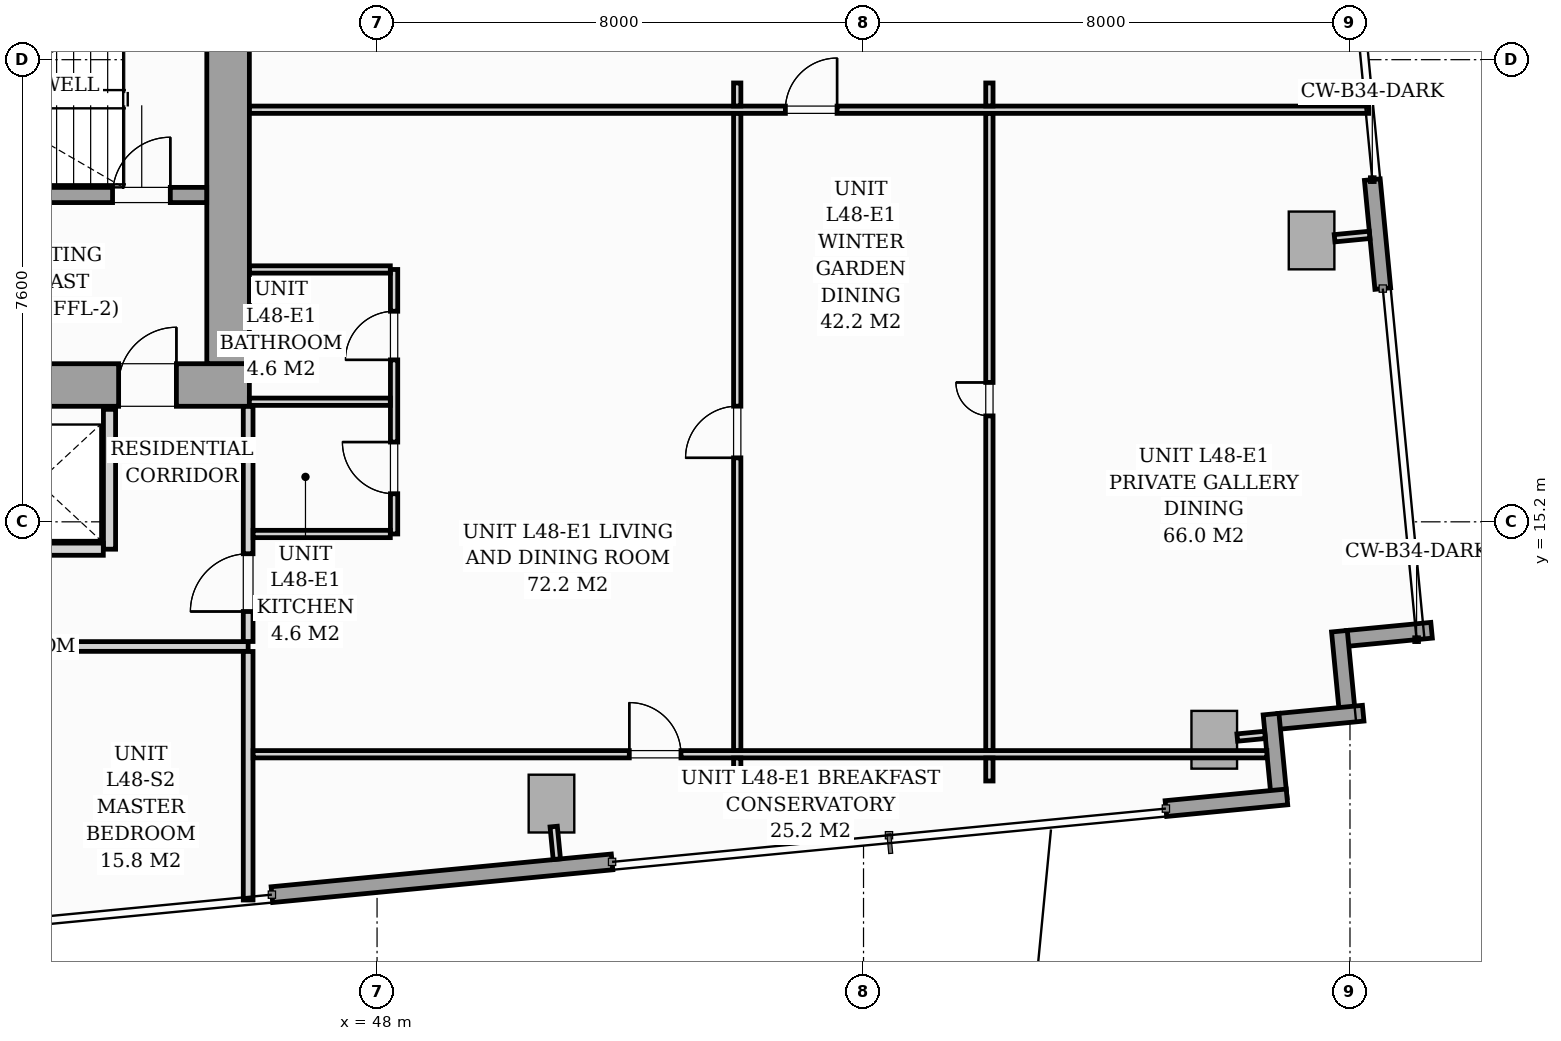
"""IFC4 building model, lengths in metres.
Left out: names, types, materials, properties, quantities, classifications, styles, units other than length and angle.
Written with IfcOpenShell. Run it as: python <this file> out.ifc"""

import sys

from ifc_helpers import new_model, si_unit, direction, frame, frame_2d, origin, origin_2d, place, context, subcontext, project, spatial, rectangle, i_section, extrude, source, transform, mapped, element, fill, save


model = new_model("IFC4")
c1 = context("Model", 3, precision=1e-05, world=origin(), true_north=direction((0.0, 1.0)))
c2 = subcontext(c1, "Body", "Model", "MODEL_VIEW")
j1 = project(units=[si_unit("LENGTHUNIT", "METRE"), si_unit("PLANEANGLEUNIT", "RADIAN")], contexts=[c1])
p1 = place(None, origin())
s1 = spatial("IfcSite", under=j1, at=p1, CompositionType="ELEMENT")
p2 = place(p1, origin())
s2 = spatial("IfcBuilding", under=s1, at=p2, CompositionType="ELEMENT")
p3 = place(p2, frame((0.0, 0.0, 167.8)))
s3 = spatial("IfcBuildingStorey", under=s2, at=p3, CompositionType="ELEMENT", Elevation=167.8)
m1 = source(origin(), c2, "Body", "SweptSolid", [
    extrude(i_section(OverallWidth=0.416, OverallDepth=0.446, WebThickness=0.039, FlangeThickness=0.063, FilletRadius=0.018, at=origin_2d()), origin(), (0.0, 0.0, 1.0), 5.196),
])
p4 = place(p3, frame((45.6, 17.4, 0.002), z_axis=(0.0, 0.0, 1.0), x_axis=(1.0, 0.0, 0.0)))
e1 = element("IfcColumn", 1, at=p4, inside=s3, PredefinedType="PILASTER", context=c2, shape_type="MappedRepresentation", body=[
    mapped(m1, transform((0.0, 0.0, 0.0), scale=1.0)),
])
m2 = source(origin(), c2, "Body", "SweptSolid", [
    extrude(rectangle(XDim=0.75, YDim=0.95, at=origin_2d()), origin(), (0.0, 0.0, 1.0), 5.194),
])
for number, where, z_axis, x_axis in (
    (2, (50.868, 10.566, 0.004), (0.0, 0.0, 1.0), (0.995, 0.096, 0.0)),
    (3, (61.768, 11.616, 0.004), (0.0, 0.0, 1.0), (0.995, 0.096, 0.0)),
    (4, (63.368, 19.827, 0.004), (0.0, 0.0, 1.0), (0.995, 0.096, 0.0)),
):
    element("IfcColumn", number, at=place(p3, frame(where, z_axis=z_axis, x_axis=x_axis)), inside=s3, PredefinedType="COLUMN", context=c2, shape_type="MappedRepresentation", body=[
        mapped(m2, transform((0.0, 0.0, 0.0), scale=1.0)),
    ])
p5 = place(p3, frame((64.367, 20.827, 0.0), z_axis=(0.0, 0.0, 1.0), x_axis=(0.09589072759, -0.995391866735, 0.0)))
e5 = element("IfcWall", 5, at=p5, inside=s3, PredefinedType="STANDARD", context=c2, shape_type="SweptSolid", body=[
    extrude(rectangle(XDim=1.8, YDim=0.26, at=frame_2d((0.9, 0.0))), origin(), (0.0, 0.0, 1.0), 4.94),
])
p6 = place(p3, frame((65.342, 13.417, 0.0), z_axis=(0.0, 0.0, 1.0), x_axis=(-0.99540774648, -0.095725744959, 0.0)))
e6 = element("IfcWall", 6, at=p6, inside=s3, PredefinedType="STANDARD", context=c2, shape_type="SweptSolid", body=[
    extrude(rectangle(XDim=1.395, YDim=0.26, at=frame_2d((0.698, 0.0))), origin(), (0.0, 0.0, 1.0), 4.94),
])
p7 = place(p3, frame((63.826, 13.401, 0.0), z_axis=(0.0, 0.0, 1.0), x_axis=(0.095915846097, -0.995389446633, 0.0)))
e7 = element("IfcWall", 7, at=p7, inside=s3, PredefinedType="STANDARD", context=c2, shape_type="SweptSolid", body=[
    extrude(rectangle(XDim=1.395, YDim=0.26, at=frame_2d((0.697, 0.0))), origin(), (0.0, 0.0, 1.0), 4.94),
])
for number, where, z_axis, x_axis in (
    (8, (64.217, 12.053, 0.0), (0.0, 0.0, 1.0), (-0.995, -0.096, 0.0)),
    (9, (62.702, 12.037, 0.0), (0.0, 0.0, 1.0), (0.096, -0.995, 0.0)),
):
    element("IfcWall", number, at=place(p3, frame(where, z_axis=z_axis, x_axis=x_axis)), inside=s3, PredefinedType="STANDARD", context=c2, shape_type="SweptSolid", body=[
        extrude(rectangle(XDim=1.395, YDim=0.26, at=frame_2d((0.698, 0.0))), origin(), (0.0, 0.0, 1.0), 4.94),
    ])
p8 = place(p3, frame((62.963, 10.676, 0.0), z_axis=(0.0, 0.0, 1.0), x_axis=(-0.995397839199, -0.095828710298, 0.0)))
e10 = element("IfcWall", 10, at=p8, inside=s3, PredefinedType="STANDARD", context=c2, shape_type="SweptSolid", body=[
    extrude(rectangle(XDim=2.0, YDim=0.26, at=frame_2d((1.0, 0.0))), origin(), (0.0, 0.0, 1.0), 4.94),
])
p9 = place(p3, frame((51.865, 9.607, 0.0), z_axis=(0.0, 0.0, 1.0), x_axis=(-0.995397720284, -0.09582994549, 0.0)))
e11 = element("IfcWall", 11, at=p9, inside=s3, PredefinedType="STANDARD", context=c2, shape_type="SweptSolid", body=[
    extrude(rectangle(XDim=5.62, YDim=0.26, at=frame_2d((2.81, 0.0))), origin(), (0.0, 0.0, 1.0), 4.94),
])
p10 = place(p3, frame((26.1, 17.45, 0.0), z_axis=(0.0, 0.0, 1.0), x_axis=(1.0, 0.0, 0.0)))
e12 = element("IfcWall", 12, at=p10, inside=s3, PredefinedType="SHEAR", context=c2, shape_type="SweptSolid", body=[
    extrude(rectangle(XDim=19.8, YDim=0.7, at=frame_2d((9.9, 0.0))), origin(), (0.0, 0.0, 1.0), 5.2),
])
p11 = place(p10, frame((1.05, 0.0, 0.0)))
e13 = element("IfcOpeningElement", 13, at=p11, cuts=e12, PredefinedType="OPENING", context=c2, shape_type="SweptSolid", body=[
    extrude(rectangle(XDim=0.95, YDim=2.06, at=frame_2d((0.475, 1.03))), frame((0.0, 0.36, 0.0), z_axis=(0.0, -1.0, 0.0), x_axis=(1.0, 0.0, 0.0)), (0.0, 0.0, 1.0), 0.72),
])
p12 = place(p10, frame((9.48, 0.0, 0.0)))
e14 = element("IfcOpeningElement", 14, at=p12, cuts=e12, PredefinedType="OPENING", context=c2, shape_type="SweptSolid", body=[
    extrude(rectangle(XDim=0.9, YDim=2.06, at=frame_2d((0.45, 1.03))), frame((0.0, 0.36, 0.0), z_axis=(0.0, -1.0, 0.0), x_axis=(1.0, 0.0, 0.0)), (0.0, 0.0, 1.0), 0.72),
])
p13 = place(p10, frame((17.65, 0.0, 0.0)))
e15 = element("IfcOpeningElement", 15, at=p13, cuts=e12, PredefinedType="OPENING", context=c2, shape_type="SweptSolid", body=[
    extrude(rectangle(XDim=0.95, YDim=2.06, at=frame_2d((0.475, 1.03))), frame((0.0, 0.36, 0.0), z_axis=(0.0, -1.0, 0.0), x_axis=(1.0, 0.0, 0.0)), (0.0, 0.0, 1.0), 0.72),
])
p14 = place(p3, frame((45.55, 17.802, 0.0), z_axis=(0.0, 0.0, 1.0), x_axis=(0.0, 1.0, 0.0)))
e16 = element("IfcWall", 16, at=p14, inside=s3, PredefinedType="SHEAR", context=c2, shape_type="SweptSolid", body=[
    extrude(rectangle(XDim=5.796, YDim=0.7, at=frame_2d((2.898, 0.0))), origin(), (0.0, 0.0, 1.0), 5.2),
])
p15 = place(p3, frame((37.05, 20.575, 0.0), z_axis=(0.0, 0.0, 1.0), x_axis=(1.0, 0.0, 0.0)))
e17 = element("IfcWall", 17, at=p15, inside=s3, PredefinedType="SOLIDWALL", context=c2, shape_type="SweptSolid", body=[
    extrude(rectangle(XDim=8.148, YDim=0.25, at=frame_2d((4.074, 0.0))), origin(), (0.0, 0.0, 1.0), 5.2),
])
p16 = place(p15, frame((6.6, 0.0, 0.0)))
e18 = element("IfcOpeningElement", 18, at=p16, cuts=e17, PredefinedType="OPENING", context=c2, shape_type="SweptSolid", body=[
    extrude(rectangle(XDim=0.95, YDim=2.06, at=frame_2d((0.475, 1.03))), frame((0.0, 0.135, 0.0), z_axis=(0.0, -1.0, 0.0), x_axis=(1.0, 0.0, 0.0)), (0.0, 0.0, 1.0), 0.27),
])
p17 = place(p3, frame((43.6, 14.75, 0.0), z_axis=(0.0, 0.0, 1.0), x_axis=(0.0, 1.0, 0.0)))
e19 = element("IfcWall", 19, at=p17, inside=s3, PredefinedType="PARTITIONING", context=c2, shape_type="SweptSolid", body=[
    extrude(rectangle(XDim=2.3, YDim=0.2, at=frame_2d((1.15, 0.0))), origin(), (0.0, 0.0, 1.0), 4.94),
])
p18 = place(p3, frame((41.352, 14.75, 0.0), z_axis=(0.0, 0.0, 1.0), x_axis=(1.0, 0.0, 0.0)))
e20 = element("IfcWall", 20, at=p18, inside=s3, PredefinedType="PARTITIONING", context=c2, shape_type="SweptSolid", body=[
    extrude(rectangle(XDim=2.146, YDim=0.2, at=frame_2d((1.073, 0.0))), origin(), (0.0, 0.0, 1.0), 4.94),
])
p19 = place(p3, frame((22.6, 13.15, 0.0), z_axis=(0.0, 0.0, 1.0), x_axis=(1.0, 0.0, 0.0)))
e21 = element("IfcWall", 21, at=p19, inside=s3, PredefinedType="PARTITIONING", context=c2, shape_type="SweptSolid", body=[
    extrude(rectangle(XDim=23.28, YDim=0.16, at=frame_2d((11.64, 0.0))), origin(), (0.0, 0.0, 1.0), 4.94),
])
p20 = place(p19, frame((0.607, 0.0, 0.0)))
e22 = element("IfcOpeningElement", 22, at=p20, cuts=e21, PredefinedType="OPENING", context=c2, shape_type="SweptSolid", body=[
    extrude(rectangle(XDim=0.95, YDim=2.06, at=frame_2d((0.475, 1.03))), frame((0.0, 0.09, 0.0), z_axis=(0.0, -1.0, 0.0), x_axis=(1.0, 0.0, 0.0)), (0.0, 0.0, 1.0), 0.18),
])
p21 = place(p19, frame((11.717, 0.0, 0.0)))
e23 = element("IfcOpeningElement", 23, at=p21, cuts=e21, PredefinedType="OPENING", context=c2, shape_type="SweptSolid", body=[
    extrude(rectangle(XDim=0.95, YDim=2.06, at=frame_2d((0.475, 1.03))), frame((0.0, 0.09, 0.0), z_axis=(0.0, -1.0, 0.0), x_axis=(1.0, 0.0, 0.0)), (0.0, 0.0, 1.0), 0.18),
])
p22 = place(p3, frame((45.88, 8.981, 0.0), z_axis=(0.0, 0.0, 1.0), x_axis=(0.0, 1.0, 0.0)))
e24 = element("IfcWall", 24, at=p22, inside=s3, PredefinedType="PARTITIONING", context=c2, shape_type="SweptSolid", body=[
    extrude(rectangle(XDim=4.087, YDim=0.16, at=frame_2d((2.043, 0.0))), origin(), (0.0, 0.0, 1.0), 4.94),
])
p23 = place(p3, frame((45.88, 13.232, 0.0), z_axis=(0.0, 0.0, 1.0), x_axis=(0.0, 1.0, 0.0)))
e25 = element("IfcWall", 25, at=p23, inside=s3, PredefinedType="PARTITIONING", context=c2, shape_type="SweptSolid", body=[
    extrude(rectangle(XDim=3.866, YDim=0.16, at=frame_2d((1.933, 0.0))), origin(), (0.0, 0.0, 1.0), 4.94),
])
p24 = place(p23, frame((0.493, 0.0, 0.0)))
e26 = element("IfcOpeningElement", 26, at=p24, cuts=e25, PredefinedType="OPENING", context=c2, shape_type="SweptSolid", body=[
    extrude(rectangle(XDim=0.95, YDim=2.06, at=frame_2d((0.475, 1.03))), frame((0.0, 0.09, 0.0), z_axis=(0.0, -1.0, 0.0), x_axis=(1.0, 0.0, 0.0)), (0.0, 0.0, 1.0), 0.18),
])
p25 = place(p3, frame((48.28, 15.0, 0.0), z_axis=(0.0, 0.0, 1.0), x_axis=(0.0, 1.0, 0.0)))
e27 = element("IfcWall", 27, at=p25, inside=s3, PredefinedType="PARTITIONING", context=c2, shape_type="SweptSolid", body=[
    extrude(rectangle(XDim=4.35, YDim=0.12, at=frame_2d((2.175, 0.0))), origin(), (0.0, 0.0, 1.0), 4.94),
])
p26 = place(p25, frame((0.662, 0.0, 0.0)))
e28 = element("IfcOpeningElement", 28, at=p26, cuts=e27, PredefinedType="OPENING", context=c2, shape_type="SweptSolid", body=[
    extrude(rectangle(XDim=0.85, YDim=2.05, at=frame_2d((0.425, 1.025))), frame((0.0, 0.07, 0.0), z_axis=(0.0, -1.0, 0.0), x_axis=(1.0, 0.0, 0.0)), (0.0, 0.0, 1.0), 0.14),
])
p27 = place(p25, frame((2.863, 0.0, 0.0)))
e29 = element("IfcOpeningElement", 29, at=p27, cuts=e27, PredefinedType="OPENING", context=c2, shape_type="SweptSolid", body=[
    extrude(rectangle(XDim=0.8, YDim=2.02, at=frame_2d((0.4, 1.01))), frame((0.0, 0.07, 0.0), z_axis=(0.0, -1.0, 0.0), x_axis=(1.0, 0.0, 0.0)), (0.0, 0.0, 1.0), 0.14),
])
p28 = place(p3, frame((45.9, 17.175, 0.0), z_axis=(0.0, 0.0, 1.0), x_axis=(1.0, 0.0, 0.0)))
e30 = element("IfcWall", 30, at=p28, inside=s3, PredefinedType="PARTITIONING", context=c2, shape_type="SweptSolid", body=[
    extrude(rectangle(XDim=2.318, YDim=0.12, at=frame_2d((1.159, 0.0))), origin(), (0.0, 0.0, 1.0), 4.94),
])
p29 = place(p3, frame((45.962, 15.0, 0.0), z_axis=(0.0, 0.0, 1.0), x_axis=(1.0, 0.0, 0.0)))
e31 = element("IfcWall", 31, at=p29, inside=s3, PredefinedType="PARTITIONING", context=c2, shape_type="SweptSolid", body=[
    extrude(rectangle(XDim=2.256, YDim=0.12, at=frame_2d((1.128, 0.0))), origin(), (0.0, 0.0, 1.0), 4.94),
])
p30 = place(p3, frame((45.902, 19.35, 0.0), z_axis=(0.0, 0.0, 1.0), x_axis=(1.0, 0.0, 0.0)))
e32 = element("IfcWall", 32, at=p30, inside=s3, PredefinedType="PARTITIONING", context=c2, shape_type="SweptSolid", body=[
    extrude(rectangle(XDim=2.316, YDim=0.12, at=frame_2d((1.158, 0.0))), origin(), (0.0, 0.0, 1.0), 4.94),
])
p31 = place(p3, frame((45.902, 21.977, 0.0), z_axis=(0.0, 0.0, 1.0), x_axis=(1.0, 0.0, 0.0)))
e33 = element("IfcWall", 33, at=p31, inside=s3, PredefinedType="PARTITIONING", context=c2, shape_type="SweptSolid", body=[
    extrude(rectangle(XDim=18.404, YDim=0.12, at=frame_2d((9.202, 0.0))), origin(), (0.0, 0.0, 1.0), 4.94),
])
p32 = place(p31, frame((8.813, 0.0, 0.0)))
e34 = element("IfcOpeningElement", 34, at=p32, cuts=e33, PredefinedType="OPENING", context=c2, shape_type="SweptSolid", body=[
    extrude(rectangle(XDim=0.85, YDim=2.05, at=frame_2d((0.425, 1.025))), frame((0.0, 0.07, 0.0), z_axis=(0.0, -1.0, 0.0), x_axis=(1.0, 0.0, 0.0)), (0.0, 0.0, 1.0), 0.14),
])
p33 = place(p3, frame((45.962, 11.378, 0.0), z_axis=(0.0, 0.0, 1.0), x_axis=(1.0, 0.0, 0.0)))
e35 = element("IfcWall", 35, at=p33, inside=s3, PredefinedType="PARTITIONING", context=c2, shape_type="SweptSolid", body=[
    extrude(rectangle(XDim=16.671, YDim=0.12, at=frame_2d((8.335, 0.0))), origin(), (0.0, 0.0, 1.0), 4.383),
])
p34 = place(p33, frame((6.186, 0.0, 0.0)))
e36 = element("IfcOpeningElement", 36, at=p34, cuts=e35, PredefinedType="OPENING", context=c2, shape_type="SweptSolid", body=[
    extrude(rectangle(XDim=0.85, YDim=2.05, at=frame_2d((0.425, 1.025))), frame((0.0, 0.07, 0.0), z_axis=(0.0, -1.0, 0.0), x_axis=(1.0, 0.0, 0.0)), (0.0, 0.0, 1.0), 0.14),
])
p35 = place(p3, frame((58.07, 10.938, 0.0), z_axis=(0.0, 0.0, 1.0), x_axis=(0.0, 1.0, 0.0)))
e37 = element("IfcWall", 37, at=p35, inside=s3, PredefinedType="PARTITIONING", context=c2, shape_type="SweptSolid", body=[
    extrude(rectangle(XDim=0.378, YDim=0.12, at=frame_2d((0.189, 0.0))), origin(), (0.0, 0.0, 1.0), 4.94),
])
p36 = place(p3, frame((58.07, 11.44, 0.0), z_axis=(0.0, 0.0, 1.0), x_axis=(0.0, 1.0, 0.0)))
e38 = element("IfcWall", 38, at=p36, inside=s3, PredefinedType="PARTITIONING", context=c2, shape_type="SweptSolid", body=[
    extrude(rectangle(XDim=10.475, YDim=0.12, at=frame_2d((5.238, 0.0))), origin(), (0.0, 0.0, 1.0), 4.94),
])
p37 = place(p36, frame((5.502, 0.0, 0.0)))
e39 = element("IfcOpeningElement", 39, at=p37, cuts=e38, PredefinedType="OPENING", context=c2, shape_type="SweptSolid", body=[
    extrude(rectangle(XDim=0.55, YDim=2.0, at=frame_2d((0.275, 1.0))), frame((0.0, 0.07, 0.0), z_axis=(0.0, -1.0, 0.0), x_axis=(1.0, 0.0, 0.0)), (0.0, 0.0, 1.0), 0.14),
])
for number, where, z_axis, x_axis in (
    (40, (58.07, 22.039, 0.0), (0.0, 0.0, 1.0), (0.0, 1.0, 0.0)),
    (41, (53.923, 10.938, 0.0), (0.0, 0.0, 1.0), (0.0, 1.0, 0.0)),
):
    element("IfcWall", number, at=place(p3, frame(where, z_axis=z_axis, x_axis=x_axis)), inside=s3, PredefinedType="PARTITIONING", context=c2, shape_type="SweptSolid", body=[
        extrude(rectangle(XDim=0.378, YDim=0.12, at=frame_2d((0.189, 0.0))), origin(), (0.0, 0.0, 1.0), 4.94),
    ])
p38 = place(p3, frame((53.923, 11.44, 0.0), z_axis=(0.0, 0.0, 1.0), x_axis=(0.0, 1.0, 0.0)))
e42 = element("IfcWall", 42, at=p38, inside=s3, PredefinedType="PARTITIONING", context=c2, shape_type="SweptSolid", body=[
    extrude(rectangle(XDim=10.475, YDim=0.12, at=frame_2d((5.238, 0.0))), origin(), (0.0, 0.0, 1.0), 4.94),
])
p39 = place(p38, frame((4.812, 0.0, 0.0)))
e43 = element("IfcOpeningElement", 43, at=p39, cuts=e42, PredefinedType="OPENING", context=c2, shape_type="SweptSolid", body=[
    extrude(rectangle(XDim=0.85, YDim=2.05, at=frame_2d((0.425, 1.025))), frame((0.0, 0.07, 0.0), z_axis=(0.0, -1.0, 0.0), x_axis=(1.0, 0.0, 0.0)), (0.0, 0.0, 1.0), 0.14),
])
p40 = place(p3, frame((53.923, 22.039, 0.0), z_axis=(0.0, 0.0, 1.0), x_axis=(0.0, 1.0, 0.0)))
e44 = element("IfcWall", 44, at=p40, inside=s3, PredefinedType="PARTITIONING", context=c2, shape_type="SweptSolid", body=[
    extrude(rectangle(XDim=0.378, YDim=0.12, at=frame_2d((0.189, 0.0))), origin(), (0.0, 0.0, 1.0), 4.94),
])
p41 = place(p3, frame((50.905, 10.188, 0.0), z_axis=(0.0, 0.0, 1.0), x_axis=(0.095772948675, -0.995403205893, 0.0)))
e45 = element("IfcWall", 45, at=p41, inside=s3, PredefinedType="PARTITIONING", context=c2, shape_type="SweptSolid", body=[
    extrude(rectangle(XDim=0.538, YDim=0.12, at=frame_2d((0.269, 0.0))), origin(), (0.0, 0.0, 1.0), 4.94),
])
p42 = place(p3, frame((62.146, 11.652, 0.0), z_axis=(0.0, 0.0, 1.0), x_axis=(0.995384576284, 0.09596637586, 0.0)))
e46 = element("IfcWall", 46, at=p42, inside=s3, PredefinedType="PARTITIONING", context=c2, shape_type="SweptSolid", body=[
    extrude(rectangle(XDim=0.458, YDim=0.12, at=frame_2d((0.229, 0.0))), origin(), (0.0, 0.0, 1.0), 4.94),
])
p43 = place(p3, frame((63.747, 19.864, 0.0), z_axis=(0.0, 0.0, 1.0), x_axis=(0.995390432481, 0.095905614674, 0.0)))
e47 = element("IfcWall", 47, at=p43, inside=s3, PredefinedType="PARTITIONING", context=c2, shape_type="SweptSolid", body=[
    extrude(rectangle(XDim=0.578, YDim=0.12, at=frame_2d((0.289, 0.0))), origin(), (0.0, 0.0, 1.0), 4.94),
])
m3 = source(origin(), c2, "Body", "SweptSolid", [
    extrude(rectangle(XDim=0.95, YDim=2.06, at=frame_2d((0.475, 1.03))), frame((0.0, 0.025, 0.0), z_axis=(0.0, -1.0, 0.0), x_axis=(1.0, 0.0, 0.0)), (0.0, 0.0, 1.0), 0.05),
])
p44 = place(p13, origin())
e48 = element("IfcDoor", 48, at=p44, inside=s3, OperationType="SINGLE_SWING_RIGHT", PredefinedType="DOOR", context=c2, shape_type="MappedRepresentation", body=[
    mapped(m3, transform((0.0, 0.0, 0.0), scale=1.0)),
])
fill(e15, e48)
p45 = place(p16, origin())
e49 = element("IfcDoor", 49, at=p45, inside=s3, OperationType="SINGLE_SWING_RIGHT", PredefinedType="DOOR", context=c2, shape_type="MappedRepresentation", body=[
    mapped(m3, transform((0.0, 0.0, 0.0), scale=1.0)),
])
fill(e18, e49)
m4 = source(origin(), c2, "Body", "SweptSolid", [
    extrude(rectangle(XDim=0.95, YDim=2.06, at=frame_2d((0.475, 1.03))), frame((0.0, 0.025, 0.0), z_axis=(0.0, -1.0, 0.0), x_axis=(1.0, 0.0, 0.0)), (0.0, 0.0, 1.0), 0.05),
])
p46 = place(p24, origin())
e50 = element("IfcDoor", 50, at=p46, inside=s3, OperationType="SINGLE_SWING_LEFT", PredefinedType="DOOR", context=c2, shape_type="MappedRepresentation", body=[
    mapped(m4, transform((0.0, 0.0, 0.0), scale=1.0)),
])
fill(e26, e50)
m5 = source(origin(), c2, "Body", "SweptSolid", [
    extrude(rectangle(XDim=0.85, YDim=2.05, at=frame_2d((0.425, 1.025))), frame((0.0, 0.025, 0.0), z_axis=(0.0, -1.0, 0.0), x_axis=(1.0, 0.0, 0.0)), (0.0, 0.0, 1.0), 0.05),
])
p47 = place(p26, origin())
e51 = element("IfcDoor", 51, at=p47, inside=s3, OperationType="SINGLE_SWING_RIGHT", PredefinedType="DOOR", context=c2, shape_type="MappedRepresentation", body=[
    mapped(m5, transform((0.0, 0.0, 0.0), scale=1.0)),
])
fill(e28, e51)
m6 = source(origin(), c2, "Body", "SweptSolid", [
    extrude(rectangle(XDim=0.8, YDim=2.02, at=frame_2d((0.4, 1.01))), frame((0.0, 0.025, 0.0), z_axis=(0.0, -1.0, 0.0), x_axis=(1.0, 0.0, 0.0)), (0.0, 0.0, 1.0), 0.05),
])
p48 = place(p27, origin())
e52 = element("IfcDoor", 52, at=p48, inside=s3, OperationType="SINGLE_SWING_LEFT", PredefinedType="DOOR", context=c2, shape_type="MappedRepresentation", body=[
    mapped(m6, transform((0.0, 0.0, 0.0), scale=1.0)),
])
fill(e29, e52)
p49 = place(p32, origin())
e53 = element("IfcDoor", 53, at=p49, inside=s3, OperationType="SINGLE_SWING_RIGHT", PredefinedType="DOOR", context=c2, shape_type="MappedRepresentation", body=[
    mapped(m5, transform((0.0, 0.0, 0.0), scale=1.0)),
])
fill(e34, e53)
p50 = place(p34, origin())
e54 = element("IfcDoor", 54, at=p50, inside=s3, OperationType="SINGLE_SWING_LEFT", PredefinedType="DOOR", context=c2, shape_type="MappedRepresentation", body=[
    mapped(m5, transform((0.0, 0.0, 0.0), scale=1.0)),
])
fill(e36, e54)
m7 = source(origin(), c2, "Body", "SweptSolid", [
    extrude(rectangle(XDim=0.55, YDim=2.0, at=frame_2d((0.275, 1.0))), frame((0.0, 0.025, 0.0), z_axis=(0.0, -1.0, 0.0), x_axis=(1.0, 0.0, 0.0)), (0.0, 0.0, 1.0), 0.05),
])
p51 = place(p37, origin())
e55 = element("IfcDoor", 55, at=p51, inside=s3, OperationType="SINGLE_SWING_RIGHT", PredefinedType="DOOR", context=c2, shape_type="MappedRepresentation", body=[
    mapped(m7, transform((0.0, 0.0, 0.0), scale=1.0)),
])
fill(e39, e55)
p52 = place(p39, origin())
e56 = element("IfcDoor", 56, at=p52, inside=s3, OperationType="SINGLE_SWING_LEFT", PredefinedType="DOOR", context=c2, shape_type="MappedRepresentation", body=[
    mapped(m5, transform((0.0, 0.0, 0.0), scale=1.0)),
])
fill(e43, e56)
save(model, sys.argv[1])
